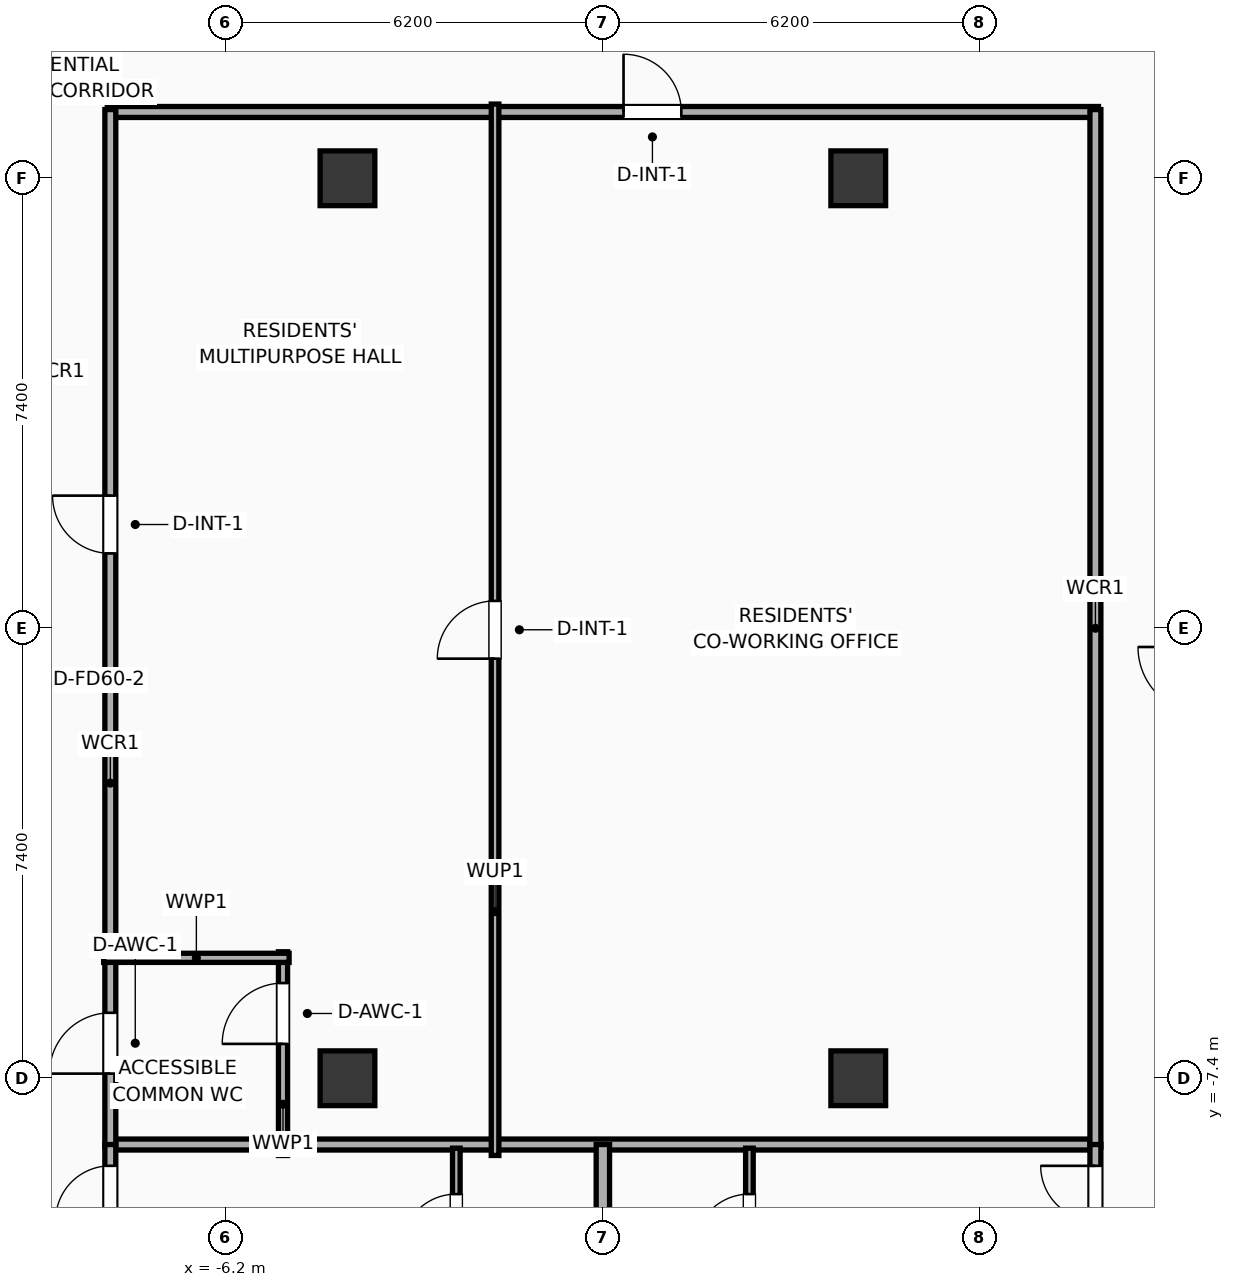
"""IFC4 building model, lengths in metres.
Left out: names, types, materials, properties, quantities, classifications, styles, units other than length and angle.
Written with IfcOpenShell. Run it as: python <this file> out.ifc"""

import sys

from ifc_helpers import new_model, si_unit, direction, frame, frame_2d, origin, origin_2d, place, context, subcontext, project, spatial, rectangle, extrude, element, fill, save


model = new_model("IFC4")
c1 = context("Model", 3, precision=1e-05, world=origin(), true_north=direction((0.0, 1.0)))
c2 = subcontext(c1, "Body", "Model", "MODEL_VIEW")
j1 = project(units=[si_unit("LENGTHUNIT", "METRE"), si_unit("PLANEANGLEUNIT", "RADIAN")], contexts=[c1])
p1 = place(None, origin())
s1 = spatial("IfcSite", under=j1, at=p1, CompositionType="ELEMENT")
p2 = place(p1, origin())
s2 = spatial("IfcBuilding", under=s1, at=p2, CompositionType="ELEMENT")
p3 = place(p2, frame((0.0, 0.0, 235.3)))
s3 = spatial("IfcBuildingStorey", under=s2, at=p3, CompositionType="ELEMENT", Elevation=235.3)
for number, where, z_axis, x_axis in (
    (1, (-4.2, -7.4, 0.0), (0.0, 0.0, 1.0), (1.0, 0.0, 0.0)),
    (2, (-4.2, 7.4, 0.0), (0.0, 0.0, 1.0), (1.0, 0.0, 0.0)),
    (3, (4.2, -7.4, 0.0), (0.0, 0.0, 1.0), (1.0, 0.0, 0.0)),
    (4, (4.2, 7.4, 0.0), (0.0, 0.0, 1.0), (1.0, 0.0, 0.0)),
):
    element("IfcColumn", number, at=place(p3, frame(where, z_axis=z_axis, x_axis=x_axis)), inside=s3, PredefinedType="COLUMN", context=c2, shape_type="SweptSolid", body=[
        extrude(rectangle(XDim=0.9, YDim=0.9, at=origin_2d()), origin(), (0.0, 0.0, 1.0), 3.9),
    ])
p4 = place(p3, frame((-8.15, 8.49, 0.0), z_axis=(0.0, 0.0, 1.0), x_axis=(1.0, 0.0, 0.0)))
e5 = element("IfcWall", 5, at=p4, inside=s3, PredefinedType="PARTITIONING", context=c2, shape_type="SweptSolid", body=[
    extrude(rectangle(XDim=16.3, YDim=0.18, at=frame_2d((8.15, 0.0))), origin(), (0.0, 0.0, 1.0), 3.65),
])
p5 = place(p4, frame((8.49, 0.0, 0.0)))
e6 = element("IfcOpeningElement", 6, at=p5, cuts=e5, PredefinedType="OPENING", context=c2, shape_type="SweptSolid", body=[
    extrude(rectangle(XDim=0.95, YDim=2.05, at=frame_2d((0.475, 1.025))), frame((0.0, 0.1, 0.0), z_axis=(0.0, -1.0, 0.0), x_axis=(1.0, 0.0, 0.0)), (0.0, 0.0, 1.0), 0.2),
])
p6 = place(p3, frame((-8.15, -8.49, 0.0), z_axis=(0.0, 0.0, 1.0), x_axis=(1.0, 0.0, 0.0)))
e7 = element("IfcWall", 7, at=p6, inside=s3, PredefinedType="PARTITIONING", context=c2, shape_type="SweptSolid", body=[
    extrude(rectangle(XDim=16.3, YDim=0.18, at=frame_2d((8.15, 0.0))), origin(), (0.0, 0.0, 1.0), 3.65),
])
p7 = place(p3, frame((-8.1, -8.53, 0.0), z_axis=(0.0, 0.0, 1.0), x_axis=(0.0, 1.0, 0.0)))
e8 = element("IfcWall", 8, at=p7, inside=s3, PredefinedType="PARTITIONING", context=c2, shape_type="SweptSolid", body=[
    extrude(rectangle(XDim=17.06, YDim=0.18, at=frame_2d((8.53, 0.0))), origin(), (0.0, 0.0, 1.0), 3.65),
])
p8 = place(p7, frame((1.206, 0.0, 0.0)))
e9 = element("IfcOpeningElement", 9, at=p8, cuts=e8, PredefinedType="OPENING", context=c2, shape_type="SweptSolid", body=[
    extrude(rectangle(XDim=1.0, YDim=2.05, at=frame_2d((0.5, 1.025))), frame((0.0, 0.1, 0.0), z_axis=(0.0, -1.0, 0.0), x_axis=(1.0, 0.0, 0.0)), (0.0, 0.0, 1.0), 0.2),
])
p9 = place(p7, frame((9.761, 0.0, 0.0)))
e10 = element("IfcOpeningElement", 10, at=p9, cuts=e8, PredefinedType="OPENING", context=c2, shape_type="SweptSolid", body=[
    extrude(rectangle(XDim=0.95, YDim=2.05, at=frame_2d((0.475, 1.025))), frame((0.0, 0.1, 0.0), z_axis=(0.0, -1.0, 0.0), x_axis=(1.0, 0.0, 0.0)), (0.0, 0.0, 1.0), 0.2),
])
p10 = place(p3, frame((8.1, -8.53, 0.0), z_axis=(0.0, 0.0, 1.0), x_axis=(0.0, 1.0, 0.0)))
e11 = element("IfcWall", 11, at=p10, inside=s3, PredefinedType="PARTITIONING", context=c2, shape_type="SweptSolid", body=[
    extrude(rectangle(XDim=17.06, YDim=0.18, at=frame_2d((8.53, 0.0))), origin(), (0.0, 0.0, 1.0), 3.65),
])
p11 = place(p3, frame((-5.26, -8.67, 0.0), z_axis=(0.0, 0.0, 1.0), x_axis=(0.0, 1.0, 0.0)))
e12 = element("IfcWall", 12, at=p11, inside=s3, PredefinedType="PLUMBINGWALL", context=c2, shape_type="SweptSolid", body=[
    extrude(rectangle(XDim=3.35, YDim=0.15, at=frame_2d((1.675, 0.0))), origin(), (0.0, 0.0, 1.0), 3.65),
])
p12 = place(p11, frame((1.835, 0.0, 0.0)))
e13 = element("IfcOpeningElement", 13, at=p12, cuts=e12, PredefinedType="OPENING", context=c2, shape_type="SweptSolid", body=[
    extrude(rectangle(XDim=1.0, YDim=2.05, at=frame_2d((0.5, 1.025))), frame((0.0, 0.085, 0.0), z_axis=(0.0, -1.0, 0.0), x_axis=(1.0, 0.0, 0.0)), (0.0, 0.0, 1.0), 0.17),
])
p13 = place(p3, frame((-8.21, -5.42, 0.0), z_axis=(0.0, 0.0, 1.0), x_axis=(1.0, 0.0, 0.0)))
e14 = element("IfcWall", 14, at=p13, inside=s3, PredefinedType="PLUMBINGWALL", context=c2, shape_type="SweptSolid", body=[
    extrude(rectangle(XDim=3.05, YDim=0.15, at=frame_2d((1.525, 0.0))), origin(), (0.0, 0.0, 1.0), 3.65),
])
p14 = place(p3, frame((-1.773, -8.67, 0.0), z_axis=(0.0, 0.0, 1.0), x_axis=(0.0, 1.0, 0.0)))
e15 = element("IfcWall", 15, at=p14, inside=s3, PredefinedType="PARTITIONING", context=c2, shape_type="SweptSolid", body=[
    extrude(rectangle(XDim=17.29, YDim=0.125, at=frame_2d((8.645, 0.0))), origin(), (0.0, 0.0, 1.0), 3.65),
])
p15 = place(p14, frame((8.17, 0.0, 0.0)))
e16 = element("IfcOpeningElement", 16, at=p15, cuts=e15, PredefinedType="OPENING", context=c2, shape_type="SweptSolid", body=[
    extrude(rectangle(XDim=0.95, YDim=2.05, at=frame_2d((0.475, 1.025))), frame((0.0, 0.073, 0.0), z_axis=(0.0, -1.0, 0.0), x_axis=(1.0, 0.0, 0.0)), (0.0, 0.0, 1.0), 0.145),
])
p16 = place(p3, frame((-2.41, -10.96, 0.0), z_axis=(0.0, 0.0, 1.0), x_axis=(0.0, 1.0, 0.0)))
e17 = element("IfcWall", 17, at=p16, inside=s3, PredefinedType="PARTITIONING", context=c2, shape_type="SweptSolid", body=[
    extrude(rectangle(XDim=2.41, YDim=0.125, at=frame_2d((1.205, 0.0))), origin(), (0.0, 0.0, 1.0), 3.65),
])
p17 = place(p16, frame((0.755, 0.0, 0.0)))
e18 = element("IfcOpeningElement", 18, at=p17, cuts=e17, PredefinedType="OPENING", context=c2, shape_type="SweptSolid", body=[
    extrude(rectangle(XDim=0.9, YDim=2.05, at=frame_2d((0.45, 1.025))), frame((0.0, 0.073, 0.0), z_axis=(0.0, -1.0, 0.0), x_axis=(1.0, 0.0, 0.0)), (0.0, 0.0, 1.0), 0.145),
])
p18 = place(p3, frame((-8.1, -18.83, 0.0), z_axis=(0.0, 0.0, 1.0), x_axis=(0.0, 1.0, 0.0)))
e19 = element("IfcWall", 19, at=p18, inside=s3, PredefinedType="PARTITIONING", context=c2, shape_type="SweptSolid", body=[
    extrude(rectangle(XDim=10.34, YDim=0.18, at=frame_2d((5.17, 0.0))), origin(), (0.0, 0.0, 1.0), 3.65),
])
p19 = place(p18, frame((9.09, 0.0, 0.0)))
e20 = element("IfcOpeningElement", 20, at=p19, cuts=e19, PredefinedType="OPENING", context=c2, shape_type="SweptSolid", body=[
    extrude(rectangle(XDim=0.9, YDim=2.05, at=frame_2d((0.45, 1.025))), frame((0.0, 0.1, 0.0), z_axis=(0.0, -1.0, 0.0), x_axis=(1.0, 0.0, 0.0)), (0.0, 0.0, 1.0), 0.2),
])
p20 = place(p3, frame((2.41, -10.96, 0.0), z_axis=(0.0, 0.0, 1.0), x_axis=(0.0, 1.0, 0.0)))
e21 = element("IfcWall", 21, at=p20, inside=s3, PredefinedType="PARTITIONING", context=c2, shape_type="SweptSolid", body=[
    extrude(rectangle(XDim=2.41, YDim=0.125, at=frame_2d((1.205, 0.0))), origin(), (0.0, 0.0, 1.0), 3.65),
])
p21 = place(p20, frame((0.755, 0.0, 0.0)))
e22 = element("IfcOpeningElement", 22, at=p21, cuts=e21, PredefinedType="OPENING", context=c2, shape_type="SweptSolid", body=[
    extrude(rectangle(XDim=0.9, YDim=2.05, at=frame_2d((0.45, 1.025))), frame((0.0, 0.073, 0.0), z_axis=(0.0, -1.0, 0.0), x_axis=(1.0, 0.0, 0.0)), (0.0, 0.0, 1.0), 0.145),
])
p22 = place(p3, frame((8.1, -18.83, 0.0), z_axis=(0.0, 0.0, 1.0), x_axis=(0.0, 1.0, 0.0)))
e23 = element("IfcWall", 23, at=p22, inside=s3, PredefinedType="PARTITIONING", context=c2, shape_type="SweptSolid", body=[
    extrude(rectangle(XDim=10.34, YDim=0.18, at=frame_2d((5.17, 0.0))), origin(), (0.0, 0.0, 1.0), 3.65),
])
p23 = place(p22, frame((9.09, 0.0, 0.0)))
e24 = element("IfcOpeningElement", 24, at=p23, cuts=e23, PredefinedType="OPENING", context=c2, shape_type="SweptSolid", body=[
    extrude(rectangle(XDim=0.9, YDim=2.05, at=frame_2d((0.45, 1.025))), frame((0.0, 0.1, 0.0), z_axis=(0.0, -1.0, 0.0), x_axis=(1.0, 0.0, 0.0)), (0.0, 0.0, 1.0), 0.2),
])
p24 = place(p3, frame((0.0, -18.83, 0.0), z_axis=(0.0, 0.0, 1.0), x_axis=(0.0, 1.0, 0.0)))
e25 = element("IfcWall", 25, at=p24, inside=s3, PredefinedType="PARTITIONING", context=c2, shape_type="SweptSolid", body=[
    extrude(rectangle(XDim=10.34, YDim=0.22, at=frame_2d((5.17, 0.0))), origin(), (0.0, 0.0, 1.0), 3.65),
])
p25 = place(p5, origin())
e26 = element("IfcDoor", 26, at=p25, inside=s3, OperationType="SINGLE_SWING_LEFT", PredefinedType="DOOR", context=c2, shape_type="SweptSolid", body=[
    extrude(rectangle(XDim=0.95, YDim=2.05, at=frame_2d((0.475, 1.025))), frame((0.0, 0.025, 0.0), z_axis=(0.0, -1.0, 0.0), x_axis=(1.0, 0.0, 0.0)), (0.0, 0.0, 1.0), 0.05),
])
fill(e6, e26)
p26 = place(p8, origin())
e27 = element("IfcDoor", 27, at=p26, inside=s3, OperationType="SINGLE_SWING_LEFT", PredefinedType="DOOR", context=c2, shape_type="SweptSolid", body=[
    extrude(rectangle(XDim=1.0, YDim=2.05, at=frame_2d((0.5, 1.025))), frame((0.0, 0.025, 0.0), z_axis=(0.0, -1.0, 0.0), x_axis=(1.0, 0.0, 0.0)), (0.0, 0.0, 1.0), 0.05),
])
fill(e9, e27)
p27 = place(p9, origin())
e28 = element("IfcDoor", 28, at=p27, inside=s3, OperationType="SINGLE_SWING_RIGHT", PredefinedType="DOOR", context=c2, shape_type="SweptSolid", body=[
    extrude(rectangle(XDim=0.95, YDim=2.05, at=frame_2d((0.475, 1.025))), frame((0.0, 0.025, 0.0), z_axis=(0.0, -1.0, 0.0), x_axis=(1.0, 0.0, 0.0)), (0.0, 0.0, 1.0), 0.05),
])
fill(e10, e28)
p28 = place(p12, origin())
e29 = element("IfcDoor", 29, at=p28, inside=s3, OperationType="SINGLE_SWING_LEFT", PredefinedType="DOOR", context=c2, shape_type="SweptSolid", body=[
    extrude(rectangle(XDim=1.0, YDim=2.05, at=frame_2d((0.5, 1.025))), frame((0.0, 0.025, 0.0), z_axis=(0.0, -1.0, 0.0), x_axis=(1.0, 0.0, 0.0)), (0.0, 0.0, 1.0), 0.05),
])
fill(e13, e29)
p29 = place(p15, origin())
e30 = element("IfcDoor", 30, at=p29, inside=s3, OperationType="SINGLE_SWING_LEFT", PredefinedType="DOOR", context=c2, shape_type="SweptSolid", body=[
    extrude(rectangle(XDim=0.95, YDim=2.05, at=frame_2d((0.475, 1.025))), frame((0.0, 0.025, 0.0), z_axis=(0.0, -1.0, 0.0), x_axis=(1.0, 0.0, 0.0)), (0.0, 0.0, 1.0), 0.05),
])
fill(e16, e30)
p30 = place(p17, origin())
e31 = element("IfcDoor", 31, at=p30, inside=s3, OperationType="SINGLE_SWING_LEFT", PredefinedType="DOOR", context=c2, shape_type="SweptSolid", body=[
    extrude(rectangle(XDim=0.9, YDim=2.05, at=frame_2d((0.45, 1.025))), frame((0.0, 0.025, 0.0), z_axis=(0.0, -1.0, 0.0), x_axis=(1.0, 0.0, 0.0)), (0.0, 0.0, 1.0), 0.05),
])
fill(e18, e31)
p31 = place(p19, origin())
e32 = element("IfcDoor", 32, at=p31, inside=s3, OperationType="SINGLE_SWING_LEFT", PredefinedType="DOOR", context=c2, shape_type="SweptSolid", body=[
    extrude(rectangle(XDim=0.9, YDim=2.05, at=frame_2d((0.45, 1.025))), frame((0.0, 0.025, 0.0), z_axis=(0.0, -1.0, 0.0), x_axis=(1.0, 0.0, 0.0)), (0.0, 0.0, 1.0), 0.05),
])
fill(e20, e32)
p32 = place(p21, origin())
e33 = element("IfcDoor", 33, at=p32, inside=s3, OperationType="SINGLE_SWING_LEFT", PredefinedType="DOOR", context=c2, shape_type="SweptSolid", body=[
    extrude(rectangle(XDim=0.9, YDim=2.05, at=frame_2d((0.45, 1.025))), frame((0.0, 0.025, 0.0), z_axis=(0.0, -1.0, 0.0), x_axis=(1.0, 0.0, 0.0)), (0.0, 0.0, 1.0), 0.05),
])
fill(e22, e33)
p33 = place(p23, origin())
e34 = element("IfcDoor", 34, at=p33, inside=s3, OperationType="SINGLE_SWING_RIGHT", PredefinedType="DOOR", context=c2, shape_type="SweptSolid", body=[
    extrude(rectangle(XDim=0.9, YDim=2.05, at=frame_2d((0.45, 1.025))), frame((0.0, 0.025, 0.0), z_axis=(0.0, -1.0, 0.0), x_axis=(1.0, 0.0, 0.0)), (0.0, 0.0, 1.0), 0.05),
])
fill(e24, e34)
save(model, sys.argv[1])
